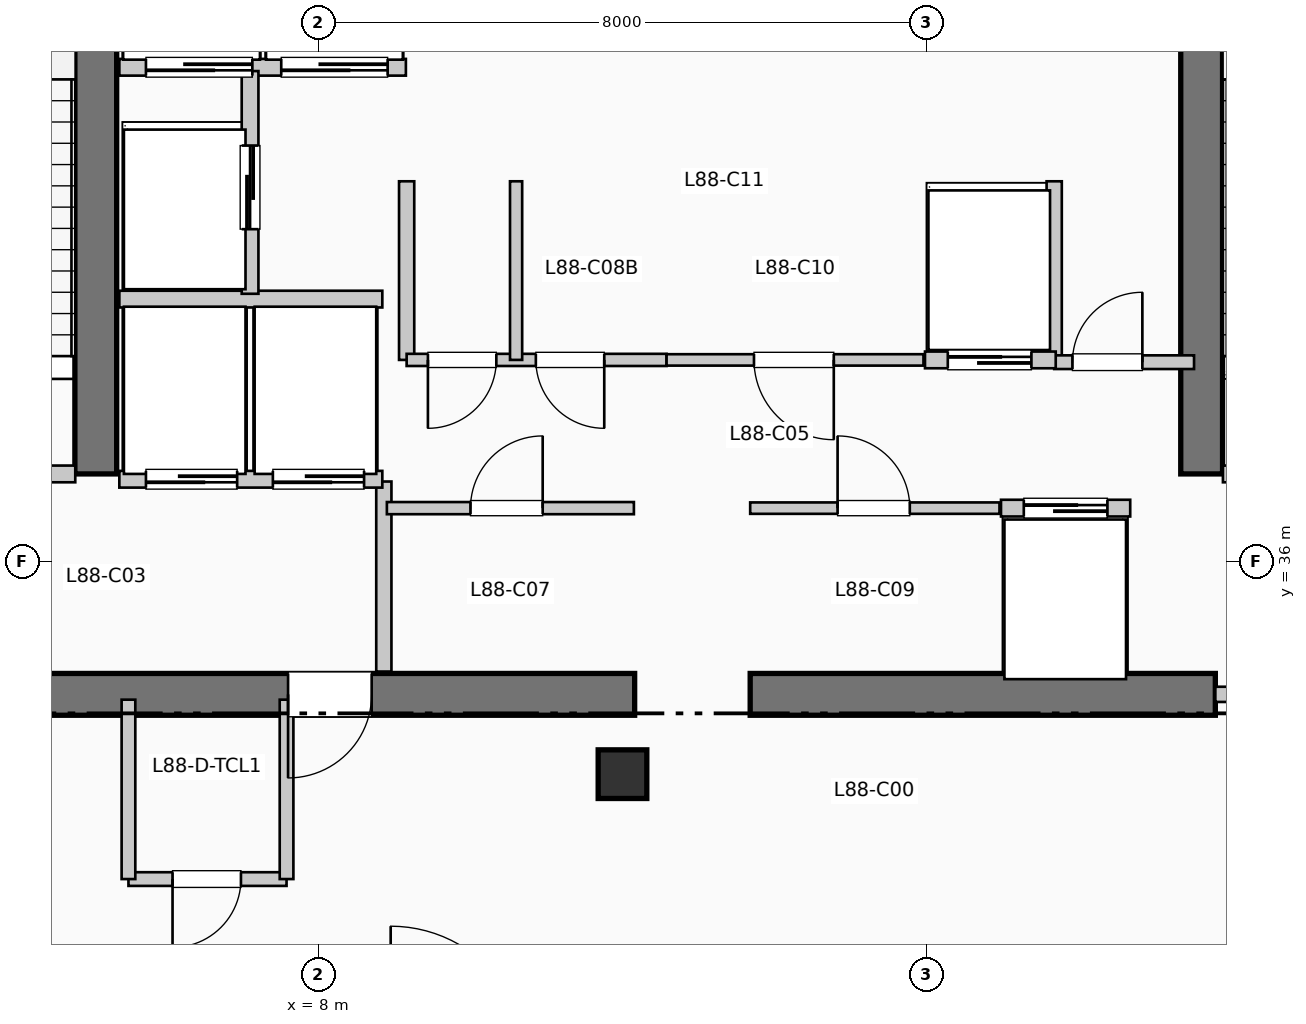
"""IFC4 building model, lengths in metres.
Left out: names, types, materials, properties, quantities, classifications, styles, units other than length and angle.
Written with IfcOpenShell. Run it as: python <this file> out.ifc"""

import sys

from ifc_helpers import new_model, si_unit, direction, frame, frame_2d, origin, origin_2d, place, context, subcontext, project, spatial, rectangle, extrude, element, fill, save


model = new_model("IFC4")
c1 = context("Model", 3, precision=1e-05, world=origin(), true_north=direction((0.0, 1.0)))
c2 = subcontext(c1, "Body", "Model", "MODEL_VIEW")
j1 = project(units=[si_unit("LENGTHUNIT", "METRE"), si_unit("PLANEANGLEUNIT", "RADIAN")], contexts=[c1])
p1 = place(None, origin())
s1 = spatial("IfcSite", under=j1, at=p1, CompositionType="ELEMENT")
p2 = place(p1, origin())
s2 = spatial("IfcBuilding", under=s1, at=p2, CompositionType="ELEMENT")
p3 = place(p2, frame((0.0, 0.0, 361.35)))
s3 = spatial("IfcBuildingStorey", under=s2, at=p3, CompositionType="ELEMENT", Elevation=361.35)
p4 = place(p3, frame((1.45, 34.25, 0.0), z_axis=(0.0, 0.0, 1.0), x_axis=(1.0, 0.0, 0.0)))
e1 = element("IfcWall", 1, at=p4, inside=s3, PredefinedType="SHEAR", context=c2, shape_type="SweptSolid", body=[
    extrude(rectangle(XDim=10.71, YDim=0.55, at=frame_2d((5.355, 0.0))), origin(), (0.0, 0.0, 1.0), 4.62),
])
p5 = place(p4, frame((7.25, 0.0, 0.0), z_axis=(0.0, 0.0, 1.0), x_axis=(-1.0, 0.0, 0.0)))
e2 = element("IfcOpeningElement", 2, at=p5, cuts=e1, PredefinedType="OPENING", context=c2, shape_type="SweptSolid", body=[
    extrude(rectangle(XDim=1.1, YDim=2.15, at=frame_2d((0.55, 1.075))), frame((0.0, 0.285, 0.0), z_axis=(0.0, -1.0, 0.0), x_axis=(1.0, 0.0, 0.0)), (0.0, 0.0, 1.0), 0.57),
])
p6 = place(p3, frame((13.68, 34.25, 0.0), z_axis=(0.0, 0.0, 1.0), x_axis=(1.0, 0.0, 0.0)))
e3 = element("IfcWall", 3, at=p6, inside=s3, PredefinedType="SHEAR", context=c2, shape_type="SweptSolid", body=[
    extrude(rectangle(XDim=6.12, YDim=0.55, at=frame_2d((3.06, 0.0))), origin(), (0.0, 0.0, 1.0), 4.62),
])
for number, where, z_axis, x_axis in (
    (4, (5.07, 37.15, 0.0), (0.0, 0.0, 1.0), (0.0, 1.0, 0.0)),
    (5, (19.62, 37.15, 0.0), (0.0, 0.0, 1.0), (0.0, 1.0, 0.0)),
):
    element("IfcWall", number, at=place(p3, frame(where, z_axis=z_axis, x_axis=x_axis)), inside=s3, PredefinedType="SHEAR", context=c2, shape_type="SweptSolid", body=[
        extrude(rectangle(XDim=7.89, YDim=0.55, at=frame_2d((3.945, 0.0))), origin(), (0.0, 0.0, 1.0), 4.62),
    ])
p7 = place(p3, frame((12.0, 33.2, 0.0), z_axis=(0.0, 0.0, 1.0), x_axis=(1.0, 0.0, 0.0)))
e6 = element("IfcColumn", 6, at=p7, inside=s3, PredefinedType="COLUMN", context=c2, shape_type="SweptSolid", body=[
    extrude(rectangle(XDim=0.64, YDim=0.64, at=origin_2d()), origin(), (0.0, 0.0, 1.0), 4.62),
])
p8 = place(p3, frame((1.65, 37.15, 0.0), z_axis=(0.0, 0.0, 1.0), x_axis=(1.0, 0.0, 0.0)))
e7 = element("IfcWall", 7, at=p8, inside=s3, PredefinedType="PARTITIONING", context=c2, shape_type="SweptSolid", body=[
    extrude(rectangle(XDim=3.15, YDim=0.22, at=frame_2d((1.575, 0.0))), origin(), (0.0, 0.0, 1.0), 4.27),
])
p9 = place(p8, frame((2.05, 0.0, 0.0), z_axis=(0.0, 0.0, 1.0), x_axis=(-1.0, 0.0, 0.0)))
e8 = element("IfcOpeningElement", 8, at=p9, cuts=e7, PredefinedType="OPENING", context=c2, shape_type="SweptSolid", body=[
    extrude(rectangle(XDim=1.05, YDim=2.15, at=frame_2d((0.525, 1.075))), frame((0.0, 0.12, 0.0), z_axis=(0.0, -1.0, 0.0), x_axis=(1.0, 0.0, 0.0)), (0.0, 0.0, 1.0), 0.24),
])
p10 = place(p3, frame((8.86, 34.55, 0.0), z_axis=(0.0, 0.0, 1.0), x_axis=(0.0, 1.0, 0.0)))
e9 = element("IfcWall", 9, at=p10, inside=s3, PredefinedType="PARTITIONING", context=c2, shape_type="SweptSolid", body=[
    extrude(rectangle(XDim=2.5, YDim=0.2, at=frame_2d((1.25, 0.0))), origin(), (0.0, 0.0, 1.0), 4.27),
])
p11 = place(p3, frame((19.9, 37.15, 0.0), z_axis=(0.0, 0.0, 1.0), x_axis=(1.0, 0.0, 0.0)))
e10 = element("IfcWall", 10, at=p11, inside=s3, PredefinedType="PARTITIONING", context=c2, shape_type="SweptSolid", body=[
    extrude(rectangle(XDim=3.15, YDim=0.22, at=frame_2d((1.575, 0.0))), origin(), (0.0, 0.0, 1.0), 4.27),
])
p12 = place(p11, frame((2.05, 0.0, 0.0), z_axis=(0.0, 0.0, 1.0), x_axis=(-1.0, 0.0, 0.0)))
e11 = element("IfcOpeningElement", 11, at=p12, cuts=e10, PredefinedType="OPENING", context=c2, shape_type="SweptSolid", body=[
    extrude(rectangle(XDim=1.05, YDim=2.15, at=frame_2d((0.525, 1.075))), frame((0.0, 0.12, 0.0), z_axis=(0.0, -1.0, 0.0), x_axis=(1.0, 0.0, 0.0)), (0.0, 0.0, 1.0), 0.24),
])
p13 = place(p3, frame((19.8, 34.25, 0.0), z_axis=(0.0, 0.0, 1.0), x_axis=(1.0, 0.0, 0.0)))
e12 = element("IfcWall", 12, at=p13, inside=s3, PredefinedType="PARTITIONING", context=c2, shape_type="SweptSolid", body=[
    extrude(rectangle(XDim=3.25, YDim=0.2, at=frame_2d((1.625, 0.0))), origin(), (0.0, 0.0, 1.0), 4.27),
])
p14 = place(p13, frame((2.15, 0.0, 0.0), z_axis=(0.0, 0.0, 1.0), x_axis=(-1.0, 0.0, 0.0)))
e13 = element("IfcOpeningElement", 13, at=p14, cuts=e12, PredefinedType="OPENING", context=c2, shape_type="SweptSolid", body=[
    extrude(rectangle(XDim=1.1, YDim=2.15, at=frame_2d((0.55, 1.075))), frame((0.0, 0.11, 0.0), z_axis=(0.0, -1.0, 0.0), x_axis=(1.0, 0.0, 0.0)), (0.0, 0.0, 1.0), 0.22),
])
p15 = place(p3, frame((5.38, 37.08, 0.0), z_axis=(0.0, 0.0, 1.0), x_axis=(1.0, 0.0, 0.0)))
e14 = element("IfcWall", 14, at=p15, inside=s3, PredefinedType="PARTITIONING", context=c2, shape_type="SweptSolid", body=[
    extrude(rectangle(XDim=3.46, YDim=0.22, at=frame_2d((1.73, 0.0))), origin(), (0.0, 0.0, 1.0), 4.27),
])
p16 = place(p15, frame((1.55, 0.0, 0.0), z_axis=(0.0, 0.0, 1.0), x_axis=(-1.0, 0.0, 0.0)))
e15 = element("IfcOpeningElement", 15, at=p16, cuts=e14, PredefinedType="OPENING", context=c2, shape_type="SweptSolid", body=[
    extrude(rectangle(XDim=1.2, YDim=2.2, at=frame_2d((0.6, 1.1))), frame((0.0, 0.12, 0.0), z_axis=(0.0, -1.0, 0.0), x_axis=(1.0, 0.0, 0.0)), (0.0, 0.0, 1.0), 0.24),
])
p17 = place(p15, frame((3.22, 0.0, 0.0), z_axis=(0.0, 0.0, 1.0), x_axis=(-1.0, 0.0, 0.0)))
e16 = element("IfcOpeningElement", 16, at=p17, cuts=e14, PredefinedType="OPENING", context=c2, shape_type="SweptSolid", body=[
    extrude(rectangle(XDim=1.2, YDim=2.2, at=frame_2d((0.6, 1.1))), frame((0.0, 0.12, 0.0), z_axis=(0.0, -1.0, 0.0), x_axis=(1.0, 0.0, 0.0)), (0.0, 0.0, 1.0), 0.24),
])
p18 = place(p3, frame((5.38, 39.45, 0.0), z_axis=(0.0, 0.0, 1.0), x_axis=(1.0, 0.0, 0.0)))
e17 = element("IfcWall", 17, at=p18, inside=s3, PredefinedType="PARTITIONING", context=c2, shape_type="SweptSolid", body=[
    extrude(rectangle(XDim=3.46, YDim=0.22, at=frame_2d((1.73, 0.0))), origin(), (0.0, 0.0, 1.0), 4.27),
])
p19 = place(p3, frame((5.38, 42.5, 0.0), z_axis=(0.0, 0.0, 1.0), x_axis=(1.0, 0.0, 0.0)))
e18 = element("IfcWall", 18, at=p19, inside=s3, PredefinedType="PARTITIONING", context=c2, shape_type="SweptSolid", body=[
    extrude(rectangle(XDim=3.77, YDim=0.22, at=frame_2d((1.885, 0.0))), origin(), (0.0, 0.0, 1.0), 4.27),
])
p20 = place(p19, frame((1.75, 0.0, 0.0), z_axis=(0.0, 0.0, 1.0), x_axis=(-1.0, 0.0, 0.0)))
e19 = element("IfcOpeningElement", 19, at=p20, cuts=e18, PredefinedType="OPENING", context=c2, shape_type="SweptSolid", body=[
    extrude(rectangle(XDim=1.4, YDim=2.2, at=frame_2d((0.7, 1.1))), frame((0.0, 0.12, 0.0), z_axis=(0.0, -1.0, 0.0), x_axis=(1.0, 0.0, 0.0)), (0.0, 0.0, 1.0), 0.24),
])
p21 = place(p19, frame((3.53, 0.0, 0.0), z_axis=(0.0, 0.0, 1.0), x_axis=(-1.0, 0.0, 0.0)))
e20 = element("IfcOpeningElement", 20, at=p21, cuts=e18, PredefinedType="OPENING", context=c2, shape_type="SweptSolid", body=[
    extrude(rectangle(XDim=1.4, YDim=2.2, at=frame_2d((0.7, 1.1))), frame((0.0, 0.12, 0.0), z_axis=(0.0, -1.0, 0.0), x_axis=(1.0, 0.0, 0.0)), (0.0, 0.0, 1.0), 0.24),
])
p22 = place(p3, frame((7.1, 39.52, 0.0), z_axis=(0.0, 0.0, 1.0), x_axis=(0.0, 1.0, 0.0)))
e21 = element("IfcWall", 21, at=p22, inside=s3, PredefinedType="PARTITIONING", context=c2, shape_type="SweptSolid", body=[
    extrude(rectangle(XDim=2.93, YDim=0.22, at=frame_2d((1.465, 0.0))), origin(), (0.0, 0.0, 1.0), 4.27),
])
p23 = place(p22, frame((0.85, 0.0, 0.0)))
e22 = element("IfcOpeningElement", 22, at=p23, cuts=e21, PredefinedType="OPENING", context=c2, shape_type="SweptSolid", body=[
    extrude(rectangle(XDim=1.1, YDim=2.2, at=frame_2d((0.55, 1.1))), frame((0.0, 0.12, 0.0), z_axis=(0.0, -1.0, 0.0), x_axis=(1.0, 0.0, 0.0)), (0.0, 0.0, 1.0), 0.24),
])
for number, where, z_axis, x_axis in (
    (23, (9.16, 38.65, 0.0), (0.0, 0.0, 1.0), (0.0, 1.0, 0.0)),
    (24, (17.68, 38.65, 0.0), (0.0, 0.0, 1.0), (0.0, 1.0, 0.0)),
):
    element("IfcWall", number, at=place(p3, frame(where, z_axis=z_axis, x_axis=x_axis)), inside=s3, PredefinedType="PARTITIONING", context=c2, shape_type="SweptSolid", body=[
        extrude(rectangle(XDim=2.35, YDim=0.2, at=frame_2d((1.175, 0.0))), origin(), (0.0, 0.0, 1.0), 4.27),
    ])
p24 = place(p3, frame((17.68, 38.62, 0.0), z_axis=(0.0, 0.0, 1.0), x_axis=(1.0, 0.0, 0.0)))
e25 = element("IfcWall", 25, at=p24, inside=s3, PredefinedType="PARTITIONING", context=c2, shape_type="SweptSolid", body=[
    extrude(rectangle(XDim=1.84, YDim=0.18, at=frame_2d((0.92, 0.0))), origin(), (0.0, 0.0, 1.0), 4.27),
])
p25 = place(p24, frame((0.24, 0.0, 0.0)))
e26 = element("IfcOpeningElement", 26, at=p25, cuts=e25, PredefinedType="OPENING", context=c2, shape_type="SweptSolid", body=[
    extrude(rectangle(XDim=0.92, YDim=2.1, at=frame_2d((0.46, 1.05))), frame((0.0, 0.1, 0.0), z_axis=(0.0, -1.0, 0.0), x_axis=(1.0, 0.0, 0.0)), (0.0, 0.0, 1.0), 0.2),
])
p26 = place(p3, frame((5.5, 31.82, 0.0), z_axis=(0.0, 0.0, 1.0), x_axis=(1.0, 0.0, 0.0)))
e27 = element("IfcWall", 27, at=p26, inside=s3, PredefinedType="PLUMBINGWALL", context=c2, shape_type="SweptSolid", body=[
    extrude(rectangle(XDim=2.08, YDim=0.18, at=frame_2d((1.04, 0.0))), origin(), (0.0, 0.0, 1.0), 4.27),
])
p27 = place(p26, frame((1.48, 0.0, 0.0), z_axis=(0.0, 0.0, 1.0), x_axis=(-1.0, 0.0, 0.0)))
e28 = element("IfcOpeningElement", 28, at=p27, cuts=e27, PredefinedType="OPENING", context=c2, shape_type="SweptSolid", body=[
    extrude(rectangle(XDim=0.9, YDim=2.1, at=frame_2d((0.45, 1.05))), frame((0.0, 0.1, 0.0), z_axis=(0.0, -1.0, 0.0), x_axis=(1.0, 0.0, 0.0)), (0.0, 0.0, 1.0), 0.2),
])
for number, where, z_axis, x_axis in (
    (29, (7.58, 31.82, 0.0), (0.0, 0.0, 1.0), (0.0, 1.0, 0.0)),
    (30, (5.5, 31.82, 0.0), (0.0, 0.0, 1.0), (0.0, 1.0, 0.0)),
):
    element("IfcWall", number, at=place(p3, frame(where, z_axis=z_axis, x_axis=x_axis)), inside=s3, PredefinedType="PLUMBINGWALL", context=c2, shape_type="SweptSolid", body=[
        extrude(rectangle(XDim=2.36, YDim=0.18, at=frame_2d((1.18, 0.0))), origin(), (0.0, 0.0, 1.0), 4.27),
    ])
p28 = place(p3, frame((8.9, 36.7, 0.0), z_axis=(0.0, 0.0, 1.0), x_axis=(1.0, 0.0, 0.0)))
e31 = element("IfcWall", 31, at=p28, inside=s3, PredefinedType="PARTITIONING", context=c2, shape_type="SweptSolid", body=[
    extrude(rectangle(XDim=3.25, YDim=0.16, at=frame_2d((1.625, 0.0))), origin(), (0.0, 0.0, 1.0), 4.27),
])
p29 = place(p28, frame((1.1, 0.0, 0.0)))
e32 = element("IfcOpeningElement", 32, at=p29, cuts=e31, PredefinedType="OPENING", context=c2, shape_type="SweptSolid", body=[
    extrude(rectangle(XDim=0.95, YDim=2.15, at=frame_2d((0.475, 1.075))), frame((0.0, 0.09, 0.0), z_axis=(0.0, -1.0, 0.0), x_axis=(1.0, 0.0, 0.0)), (0.0, 0.0, 1.0), 0.18),
])
p30 = place(p3, frame((9.16, 38.65, 0.0), z_axis=(0.0, 0.0, 1.0), x_axis=(1.0, 0.0, 0.0)))
e33 = element("IfcWall", 33, at=p30, inside=s3, PredefinedType="PARTITIONING", context=c2, shape_type="SweptSolid", body=[
    extrude(rectangle(XDim=3.42, YDim=0.16, at=frame_2d((1.71, 0.0))), origin(), (0.0, 0.0, 1.0), 4.27),
])
p31 = place(p30, frame((1.18, 0.0, 0.0), z_axis=(0.0, 0.0, 1.0), x_axis=(-1.0, 0.0, 0.0)))
e34 = element("IfcOpeningElement", 34, at=p31, cuts=e33, PredefinedType="OPENING", context=c2, shape_type="SweptSolid", body=[
    extrude(rectangle(XDim=0.9, YDim=2.15, at=frame_2d((0.45, 1.075))), frame((0.0, 0.09, 0.0), z_axis=(0.0, -1.0, 0.0), x_axis=(1.0, 0.0, 0.0)), (0.0, 0.0, 1.0), 0.18),
])
p32 = place(p30, frame((2.6, 0.0, 0.0), z_axis=(0.0, 0.0, 1.0), x_axis=(-1.0, 0.0, 0.0)))
e35 = element("IfcOpeningElement", 35, at=p32, cuts=e33, PredefinedType="OPENING", context=c2, shape_type="SweptSolid", body=[
    extrude(rectangle(XDim=0.9, YDim=2.15, at=frame_2d((0.45, 1.075))), frame((0.0, 0.09, 0.0), z_axis=(0.0, -1.0, 0.0), x_axis=(1.0, 0.0, 0.0)), (0.0, 0.0, 1.0), 0.18),
])
p33 = place(p3, frame((10.6, 38.65, 0.0), z_axis=(0.0, 0.0, 1.0), x_axis=(0.0, 1.0, 0.0)))
e36 = element("IfcWall", 36, at=p33, inside=s3, PredefinedType="PARTITIONING", context=c2, shape_type="SweptSolid", body=[
    extrude(rectangle(XDim=2.35, YDim=0.16, at=frame_2d((1.175, 0.0))), origin(), (0.0, 0.0, 1.0), 4.27),
])
p34 = place(p3, frame((13.68, 36.7, 0.0), z_axis=(0.0, 0.0, 1.0), x_axis=(1.0, 0.0, 0.0)))
e37 = element("IfcWall", 37, at=p34, inside=s3, PredefinedType="PARTITIONING", context=c2, shape_type="SweptSolid", body=[
    extrude(rectangle(XDim=3.28, YDim=0.15, at=frame_2d((1.64, 0.0))), origin(), (0.0, 0.0, 1.0), 4.27),
])
p35 = place(p34, frame((1.15, 0.0, 0.0)))
e38 = element("IfcOpeningElement", 38, at=p35, cuts=e37, PredefinedType="OPENING", context=c2, shape_type="SweptSolid", body=[
    extrude(rectangle(XDim=0.95, YDim=2.15, at=frame_2d((0.475, 1.075))), frame((0.0, 0.085, 0.0), z_axis=(0.0, -1.0, 0.0), x_axis=(1.0, 0.0, 0.0)), (0.0, 0.0, 1.0), 0.17),
])
p36 = place(p3, frame((12.58, 38.65, 0.0), z_axis=(0.0, 0.0, 1.0), x_axis=(1.0, 0.0, 0.0)))
e39 = element("IfcWall", 39, at=p36, inside=s3, PredefinedType="PARTITIONING", context=c2, shape_type="SweptSolid", body=[
    extrude(rectangle(XDim=3.38, YDim=0.15, at=frame_2d((1.69, 0.0))), origin(), (0.0, 0.0, 1.0), 4.27),
])
p37 = place(p36, frame((2.2, 0.0, 0.0), z_axis=(0.0, 0.0, 1.0), x_axis=(-1.0, 0.0, 0.0)))
e40 = element("IfcOpeningElement", 40, at=p37, cuts=e39, PredefinedType="OPENING", context=c2, shape_type="SweptSolid", body=[
    extrude(rectangle(XDim=1.05, YDim=2.15, at=frame_2d((0.525, 1.075))), frame((0.0, 0.085, 0.0), z_axis=(0.0, -1.0, 0.0), x_axis=(1.0, 0.0, 0.0)), (0.0, 0.0, 1.0), 0.17),
])
p38 = place(p3, frame((16.98, 36.7, 0.0), z_axis=(0.0, 0.0, 1.0), x_axis=(1.0, 0.0, 0.0)))
e41 = element("IfcWall", 41, at=p38, inside=s3, PredefinedType="PARTITIONING", context=c2, shape_type="SweptSolid", body=[
    extrude(rectangle(XDim=1.7, YDim=0.22, at=frame_2d((0.85, 0.0))), origin(), (0.0, 0.0, 1.0), 4.27),
])
p39 = place(p38, frame((0.3, 0.0, 0.0)))
e42 = element("IfcOpeningElement", 42, at=p39, cuts=e41, PredefinedType="OPENING", context=c2, shape_type="SweptSolid", body=[
    extrude(rectangle(XDim=1.1, YDim=2.2, at=frame_2d((0.55, 1.1))), frame((0.0, 0.12, 0.0), z_axis=(0.0, -1.0, 0.0), x_axis=(1.0, 0.0, 0.0)), (0.0, 0.0, 1.0), 0.24),
])
p40 = place(p3, frame((15.98, 38.65, 0.0), z_axis=(0.0, 0.0, 1.0), x_axis=(1.0, 0.0, 0.0)))
e43 = element("IfcWall", 43, at=p40, inside=s3, PredefinedType="PARTITIONING", context=c2, shape_type="SweptSolid", body=[
    extrude(rectangle(XDim=1.72, YDim=0.22, at=frame_2d((0.86, 0.0))), origin(), (0.0, 0.0, 1.0), 4.27),
])
p41 = place(p40, frame((0.3, 0.0, 0.0)))
e44 = element("IfcOpeningElement", 44, at=p41, cuts=e43, PredefinedType="OPENING", context=c2, shape_type="SweptSolid", body=[
    extrude(rectangle(XDim=1.1, YDim=2.2, at=frame_2d((0.55, 1.1))), frame((0.0, 0.12, 0.0), z_axis=(0.0, -1.0, 0.0), x_axis=(1.0, 0.0, 0.0)), (0.0, 0.0, 1.0), 0.24),
])
p42 = place(p5, origin())
e45 = element("IfcDoor", 45, at=p42, inside=s3, OperationType="SINGLE_SWING_LEFT", PredefinedType="DOOR", context=c2, shape_type="SweptSolid", body=[
    extrude(rectangle(XDim=1.1, YDim=2.15, at=frame_2d((0.55, 1.075))), frame((0.0, 0.025, 0.0), z_axis=(0.0, -1.0, 0.0), x_axis=(1.0, 0.0, 0.0)), (0.0, 0.0, 1.0), 0.05),
])
fill(e2, e45)
p43 = place(p16, origin())
e46 = element("IfcDoor", 46, at=p43, inside=s3, OperationType="SLIDING_TO_RIGHT", PredefinedType="DOOR", context=c2, shape_type="SweptSolid", body=[
    extrude(rectangle(XDim=1.2, YDim=2.2, at=frame_2d((0.6, 1.1))), frame((0.0, 0.025, 0.0), z_axis=(0.0, -1.0, 0.0), x_axis=(1.0, 0.0, 0.0)), (0.0, 0.0, 1.0), 0.05),
])
fill(e15, e46)
p44 = place(p17, origin())
e47 = element("IfcDoor", 47, at=p44, inside=s3, OperationType="SLIDING_TO_RIGHT", PredefinedType="DOOR", context=c2, shape_type="SweptSolid", body=[
    extrude(rectangle(XDim=1.2, YDim=2.2, at=frame_2d((0.6, 1.1))), frame((0.0, 0.025, 0.0), z_axis=(0.0, -1.0, 0.0), x_axis=(1.0, 0.0, 0.0)), (0.0, 0.0, 1.0), 0.05),
])
fill(e16, e47)
p45 = place(p20, origin())
e48 = element("IfcDoor", 48, at=p45, inside=s3, OperationType="SLIDING_TO_LEFT", PredefinedType="DOOR", context=c2, shape_type="SweptSolid", body=[
    extrude(rectangle(XDim=1.4, YDim=2.2, at=frame_2d((0.7, 1.1))), frame((0.0, 0.025, 0.0), z_axis=(0.0, -1.0, 0.0), x_axis=(1.0, 0.0, 0.0)), (0.0, 0.0, 1.0), 0.05),
])
fill(e19, e48)
p46 = place(p21, origin())
e49 = element("IfcDoor", 49, at=p46, inside=s3, OperationType="SLIDING_TO_LEFT", PredefinedType="DOOR", context=c2, shape_type="SweptSolid", body=[
    extrude(rectangle(XDim=1.4, YDim=2.2, at=frame_2d((0.7, 1.1))), frame((0.0, 0.025, 0.0), z_axis=(0.0, -1.0, 0.0), x_axis=(1.0, 0.0, 0.0)), (0.0, 0.0, 1.0), 0.05),
])
fill(e20, e49)
p47 = place(p23, origin())
e50 = element("IfcDoor", 50, at=p47, inside=s3, OperationType="SLIDING_TO_LEFT", PredefinedType="DOOR", context=c2, shape_type="SweptSolid", body=[
    extrude(rectangle(XDim=1.1, YDim=2.2, at=frame_2d((0.55, 1.1))), frame((0.0, 0.025, 0.0), z_axis=(0.0, -1.0, 0.0), x_axis=(1.0, 0.0, 0.0)), (0.0, 0.0, 1.0), 0.05),
])
fill(e22, e50)
p48 = place(p25, origin())
e51 = element("IfcDoor", 51, at=p48, inside=s3, OperationType="SINGLE_SWING_RIGHT", PredefinedType="DOOR", context=c2, shape_type="SweptSolid", body=[
    extrude(rectangle(XDim=0.92, YDim=2.1, at=frame_2d((0.46, 1.05))), frame((0.0, 0.025, 0.0), z_axis=(0.0, -1.0, 0.0), x_axis=(1.0, 0.0, 0.0)), (0.0, 0.0, 1.0), 0.05),
])
fill(e26, e51)
p49 = place(p27, origin())
e52 = element("IfcDoor", 52, at=p49, inside=s3, OperationType="SINGLE_SWING_LEFT", PredefinedType="DOOR", context=c2, shape_type="SweptSolid", body=[
    extrude(rectangle(XDim=0.9, YDim=2.1, at=frame_2d((0.45, 1.05))), frame((0.0, 0.025, 0.0), z_axis=(0.0, -1.0, 0.0), x_axis=(1.0, 0.0, 0.0)), (0.0, 0.0, 1.0), 0.05),
])
fill(e28, e52)
p50 = place(p29, origin())
e53 = element("IfcDoor", 53, at=p50, inside=s3, OperationType="SINGLE_SWING_RIGHT", PredefinedType="DOOR", context=c2, shape_type="SweptSolid", body=[
    extrude(rectangle(XDim=0.95, YDim=2.15, at=frame_2d((0.475, 1.075))), frame((0.0, 0.025, 0.0), z_axis=(0.0, -1.0, 0.0), x_axis=(1.0, 0.0, 0.0)), (0.0, 0.0, 1.0), 0.05),
])
fill(e32, e53)
p51 = place(p31, origin())
e54 = element("IfcDoor", 54, at=p51, inside=s3, OperationType="SINGLE_SWING_LEFT", PredefinedType="DOOR", context=c2, shape_type="SweptSolid", body=[
    extrude(rectangle(XDim=0.9, YDim=2.15, at=frame_2d((0.45, 1.075))), frame((0.0, 0.025, 0.0), z_axis=(0.0, -1.0, 0.0), x_axis=(1.0, 0.0, 0.0)), (0.0, 0.0, 1.0), 0.05),
])
fill(e34, e54)
p52 = place(p32, origin())
e55 = element("IfcDoor", 55, at=p52, inside=s3, OperationType="SINGLE_SWING_RIGHT", PredefinedType="DOOR", context=c2, shape_type="SweptSolid", body=[
    extrude(rectangle(XDim=0.9, YDim=2.15, at=frame_2d((0.45, 1.075))), frame((0.0, 0.025, 0.0), z_axis=(0.0, -1.0, 0.0), x_axis=(1.0, 0.0, 0.0)), (0.0, 0.0, 1.0), 0.05),
])
fill(e35, e55)
p53 = place(p35, origin())
e56 = element("IfcDoor", 56, at=p53, inside=s3, OperationType="SINGLE_SWING_LEFT", PredefinedType="DOOR", context=c2, shape_type="SweptSolid", body=[
    extrude(rectangle(XDim=0.95, YDim=2.15, at=frame_2d((0.475, 1.075))), frame((0.0, 0.025, 0.0), z_axis=(0.0, -1.0, 0.0), x_axis=(1.0, 0.0, 0.0)), (0.0, 0.0, 1.0), 0.05),
])
fill(e38, e56)
p54 = place(p37, origin())
e57 = element("IfcDoor", 57, at=p54, inside=s3, OperationType="SINGLE_SWING_RIGHT", PredefinedType="DOOR", context=c2, shape_type="SweptSolid", body=[
    extrude(rectangle(XDim=1.05, YDim=2.15, at=frame_2d((0.525, 1.075))), frame((0.0, 0.025, 0.0), z_axis=(0.0, -1.0, 0.0), x_axis=(1.0, 0.0, 0.0)), (0.0, 0.0, 1.0), 0.05),
])
fill(e40, e57)
p55 = place(p39, origin())
e58 = element("IfcDoor", 58, at=p55, inside=s3, OperationType="SLIDING_TO_LEFT", PredefinedType="DOOR", context=c2, shape_type="SweptSolid", body=[
    extrude(rectangle(XDim=1.1, YDim=2.2, at=frame_2d((0.55, 1.1))), frame((0.0, 0.025, 0.0), z_axis=(0.0, -1.0, 0.0), x_axis=(1.0, 0.0, 0.0)), (0.0, 0.0, 1.0), 0.05),
])
fill(e42, e58)
p56 = place(p41, origin())
e59 = element("IfcDoor", 59, at=p56, inside=s3, OperationType="SLIDING_TO_LEFT", PredefinedType="DOOR", context=c2, shape_type="SweptSolid", body=[
    extrude(rectangle(XDim=1.1, YDim=2.2, at=frame_2d((0.55, 1.1))), frame((0.0, 0.025, 0.0), z_axis=(0.0, -1.0, 0.0), x_axis=(1.0, 0.0, 0.0)), (0.0, 0.0, 1.0), 0.05),
])
fill(e44, e59)
save(model, sys.argv[1])
